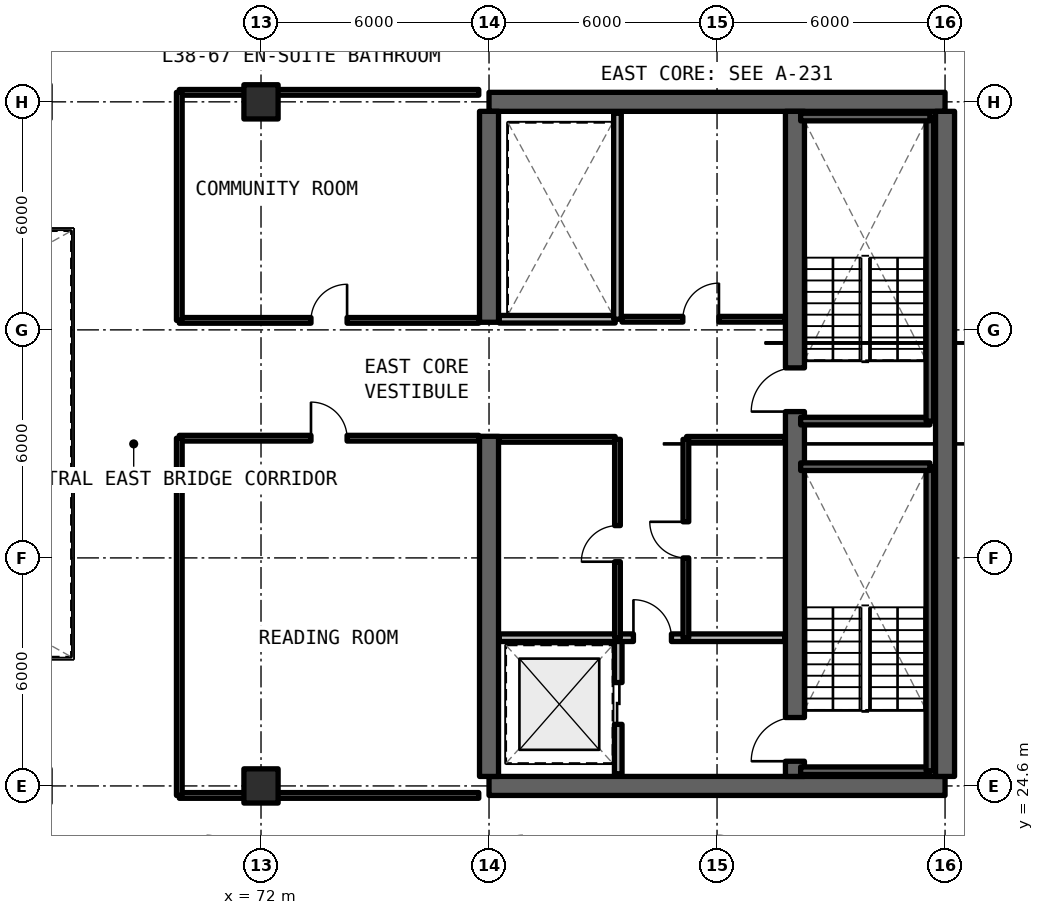
"""IFC4 building model, lengths in metres.
Left out: names, types, materials, properties, quantities, classifications, styles, units other than length and angle.
Written with IfcOpenShell. Run it as: python <this file> out.ifc"""

import sys

from ifc_helpers import new_model, si_unit, direction, frame, frame_2d, origin, origin_2d, place, context, subcontext, project, spatial, rectangle, extrude, element, fill, save


model = new_model("IFC4")
c1 = context("Model", 3, precision=1e-05, world=origin(), true_north=direction((0.0, 1.0)))
c2 = subcontext(c1, "Body", "Model", "MODEL_VIEW")
j1 = project(units=[si_unit("LENGTHUNIT", "METRE"), si_unit("PLANEANGLEUNIT", "RADIAN")], contexts=[c1])
p1 = place(None, origin())
s1 = spatial("IfcSite", under=j1, at=p1, CompositionType="ELEMENT")
p2 = place(p1, origin())
s2 = spatial("IfcBuilding", under=s1, at=p2, CompositionType="ELEMENT")
p3 = place(p2, frame((0.0, 0.0, 138.6)))
s3 = spatial("IfcBuildingStorey", under=s2, at=p3, CompositionType="ELEMENT", Elevation=138.6)
for number, where, z_axis, x_axis in (
    (1, (78.0, 24.6, 0.0), (0.0, 0.0, 1.0), (1.0, 0.0, 0.0)),
    (2, (90.0, 42.6, 0.0), (0.0, 0.0, 1.0), (-1.0, 0.0, 0.0)),
):
    element("IfcWall", number, at=place(p3, frame(where, z_axis=z_axis, x_axis=x_axis)), inside=s3, PredefinedType="SHEAR", context=c2, shape_type="SweptSolid", body=[
        extrude(rectangle(XDim=12.0, YDim=0.5, at=frame_2d((6.0, 0.0))), origin(), (0.0, 0.0, 1.0), 3.3),
    ])
p4 = place(p3, frame((90.0, 24.85, 0.0), z_axis=(0.0, 0.0, 1.0), x_axis=(0.0, 1.0, 0.0)))
e3 = element("IfcWall", 3, at=p4, inside=s3, PredefinedType="SHEAR", context=c2, shape_type="SweptSolid", body=[
    extrude(rectangle(XDim=17.5, YDim=0.5, at=frame_2d((8.75, 0.0))), origin(), (0.0, 0.0, 1.0), 3.3),
])
p5 = place(p3, frame((78.0, 24.85, 0.0), z_axis=(0.0, 0.0, 1.0), x_axis=(0.0, 1.0, 0.0)))
e4 = element("IfcWall", 4, at=p5, inside=s3, PredefinedType="SHEAR", context=c2, shape_type="SweptSolid", body=[
    extrude(rectangle(XDim=8.95, YDim=0.5, at=frame_2d((4.475, 0.0))), origin(), (0.0, 0.0, 1.0), 3.3),
])
p6 = place(p3, frame((78.0, 36.8, 0.0), z_axis=(0.0, 0.0, 1.0), x_axis=(0.0, 1.0, 0.0)))
e5 = element("IfcWall", 5, at=p6, inside=s3, PredefinedType="SHEAR", context=c2, shape_type="SweptSolid", body=[
    extrude(rectangle(XDim=5.55, YDim=0.5, at=frame_2d((2.775, 0.0))), origin(), (0.0, 0.0, 1.0), 3.3),
])
p7 = place(p3, frame((86.05, 24.85, 0.0), z_axis=(0.0, 0.0, 1.0), x_axis=(0.0, 1.0, 0.0)))
e6 = element("IfcWall", 6, at=p7, inside=s3, PredefinedType="SHEAR", context=c2, shape_type="SweptSolid", body=[
    extrude(rectangle(XDim=17.5, YDim=0.5, at=frame_2d((8.75, 0.0))), origin(), (0.0, 0.0, 1.0), 3.3),
])
p8 = place(p7, frame((0.4, 0.0, 0.0)))
e7 = element("IfcOpeningElement", 7, at=p8, cuts=e6, PredefinedType="OPENING", context=c2, shape_type="SweptSolid", body=[
    extrude(rectangle(XDim=1.15, YDim=2.15, at=frame_2d((0.575, 1.075))), frame((0.0, 0.26, 0.0), z_axis=(0.0, -1.0, 0.0), x_axis=(1.0, 0.0, 0.0)), (0.0, 0.0, 1.0), 0.52),
])
p9 = place(p7, frame((9.6, 0.0, 0.0)))
e8 = element("IfcOpeningElement", 8, at=p9, cuts=e6, PredefinedType="OPENING", context=c2, shape_type="SweptSolid", body=[
    extrude(rectangle(XDim=1.15, YDim=2.15, at=frame_2d((0.575, 1.075))), frame((0.0, 0.26, 0.0), z_axis=(0.0, -1.0, 0.0), x_axis=(1.0, 0.0, 0.0)), (0.0, 0.0, 1.0), 0.52),
])
for number, where, z_axis, x_axis in (
    (9, (72.0, 24.6, 0.0), (0.0, 0.0, 1.0), (1.0, 0.0, 0.0)),
    (10, (72.0, 42.6, 0.0), (0.0, 0.0, 1.0), (1.0, 0.0, 0.0)),
):
    element("IfcColumn", number, at=place(p3, frame(where, z_axis=z_axis, x_axis=x_axis)), inside=s3, PredefinedType="COLUMN", context=c2, shape_type="SweptSolid", body=[
        extrude(rectangle(XDim=0.9, YDim=0.9, at=origin_2d()), origin(), (0.0, 0.0, 1.0), 3.3),
    ])
p10 = place(p3, frame((81.4, 24.92, 0.0), z_axis=(0.0, 0.0, 1.0), x_axis=(0.0, 1.0, 0.0)))
e11 = element("IfcWall", 11, at=p10, inside=s3, PredefinedType="SOLIDWALL", context=c2, shape_type="SweptSolid", body=[
    extrude(rectangle(XDim=3.58, YDim=0.2, at=frame_2d((1.79, 0.0))), origin(), (0.0, 0.0, 1.0), 2.35),
])
p11 = place(p10, frame((1.3, 0.0, 0.0)))
e12 = element("IfcOpeningElement", 12, at=p11, cuts=e11, PredefinedType="OPENING", context=c2, shape_type="SweptSolid", body=[
    extrude(rectangle(XDim=1.1, YDim=2.2, at=frame_2d((0.55, 1.1))), frame((0.0, 0.11, 0.0), z_axis=(0.0, -1.0, 0.0), x_axis=(1.0, 0.0, 0.0)), (0.0, 0.0, 1.0), 0.22),
])
p12 = place(p3, frame((78.27, 28.5, 0.0), z_axis=(0.0, 0.0, 1.0), x_axis=(1.0, 0.0, 0.0)))
e13 = element("IfcWall", 13, at=p12, inside=s3, PredefinedType="SOLIDWALL", context=c2, shape_type="SweptSolid", body=[
    extrude(rectangle(XDim=7.51, YDim=0.2, at=frame_2d((3.755, 0.0))), origin(), (0.0, 0.0, 1.0), 2.35),
])
p13 = place(p12, frame((3.53, 0.0, 0.0)))
e14 = element("IfcOpeningElement", 14, at=p13, cuts=e13, PredefinedType="OPENING", context=c2, shape_type="SweptSolid", body=[
    extrude(rectangle(XDim=1.0, YDim=2.15, at=frame_2d((0.5, 1.075))), frame((0.0, 0.11, 0.0), z_axis=(0.0, -1.0, 0.0), x_axis=(1.0, 0.0, 0.0)), (0.0, 0.0, 1.0), 0.22),
])
p14 = place(p3, frame((83.2, 33.72, 0.0), z_axis=(0.0, 0.0, 1.0), x_axis=(1.0, 0.0, 0.0)))
e15 = element("IfcWall", 15, at=p14, inside=s3, PredefinedType="SOLIDWALL", context=c2, shape_type="SweptSolid", body=[
    extrude(rectangle(XDim=2.58, YDim=0.15, at=frame_2d((1.29, 0.0))), origin(), (0.0, 0.0, 1.0), 2.35),
])
p15 = place(p3, frame((83.18, 28.5, 0.0), z_axis=(0.0, 0.0, 1.0), x_axis=(0.0, 1.0, 0.0)))
e16 = element("IfcWall", 16, at=p15, inside=s3, PredefinedType="SOLIDWALL", context=c2, shape_type="SweptSolid", body=[
    extrude(rectangle(XDim=5.22, YDim=0.15, at=frame_2d((2.61, 0.0))), origin(), (0.0, 0.0, 1.0), 2.35),
])
p16 = place(p15, frame((2.1, 0.0, 0.0)))
e17 = element("IfcOpeningElement", 17, at=p16, cuts=e16, PredefinedType="OPENING", context=c2, shape_type="SweptSolid", body=[
    extrude(rectangle(XDim=0.95, YDim=2.15, at=frame_2d((0.475, 1.075))), frame((0.0, 0.085, 0.0), z_axis=(0.0, -1.0, 0.0), x_axis=(1.0, 0.0, 0.0)), (0.0, 0.0, 1.0), 0.17),
])
p17 = place(p3, frame((78.27, 33.72, 0.0), z_axis=(0.0, 0.0, 1.0), x_axis=(1.0, 0.0, 0.0)))
e18 = element("IfcWall", 18, at=p17, inside=s3, PredefinedType="SOLIDWALL", context=c2, shape_type="SweptSolid", body=[
    extrude(rectangle(XDim=3.05, YDim=0.15, at=frame_2d((1.525, 0.0))), origin(), (0.0, 0.0, 1.0), 2.35),
])
p18 = place(p3, frame((81.38, 28.5, 0.0), z_axis=(0.0, 0.0, 1.0), x_axis=(0.0, 1.0, 0.0)))
e19 = element("IfcWall", 19, at=p18, inside=s3, PredefinedType="SOLIDWALL", context=c2, shape_type="SweptSolid", body=[
    extrude(rectangle(XDim=5.22, YDim=0.15, at=frame_2d((2.61, 0.0))), origin(), (0.0, 0.0, 1.0), 2.35),
])
p19 = place(p18, frame((2.0, 0.0, 0.0)))
e20 = element("IfcOpeningElement", 20, at=p19, cuts=e19, PredefinedType="OPENING", context=c2, shape_type="SweptSolid", body=[
    extrude(rectangle(XDim=0.95, YDim=2.15, at=frame_2d((0.475, 1.075))), frame((0.0, 0.085, 0.0), z_axis=(0.0, -1.0, 0.0), x_axis=(1.0, 0.0, 0.0)), (0.0, 0.0, 1.0), 0.17),
])
p20 = place(p3, frame((81.5, 36.88, 0.0), z_axis=(0.0, 0.0, 1.0), x_axis=(1.0, 0.0, 0.0)))
e21 = element("IfcWall", 21, at=p20, inside=s3, PredefinedType="SOLIDWALL", context=c2, shape_type="SweptSolid", body=[
    extrude(rectangle(XDim=4.28, YDim=0.15, at=frame_2d((2.14, 0.0))), origin(), (0.0, 0.0, 1.0), 2.35),
])
p21 = place(p20, frame((1.6, 0.0, 0.0)))
e22 = element("IfcOpeningElement", 22, at=p21, cuts=e21, PredefinedType="OPENING", context=c2, shape_type="SweptSolid", body=[
    extrude(rectangle(XDim=0.95, YDim=2.15, at=frame_2d((0.475, 1.075))), frame((0.0, 0.085, 0.0), z_axis=(0.0, -1.0, 0.0), x_axis=(1.0, 0.0, 0.0)), (0.0, 0.0, 1.0), 0.17),
])
p22 = place(p3, frame((78.27, 36.88, 0.0), z_axis=(0.0, 0.0, 1.0), x_axis=(1.0, 0.0, 0.0)))
e23 = element("IfcWall", 23, at=p22, inside=s3, PredefinedType="SOLIDWALL", context=c2, shape_type="SweptSolid", body=[
    extrude(rectangle(XDim=3.05, YDim=0.2, at=frame_2d((1.525, 0.0))), origin(), (0.0, 0.0, 1.0), 2.35),
])
p23 = place(p3, frame((81.38, 36.88, 0.0), z_axis=(0.0, 0.0, 1.0), x_axis=(0.0, 1.0, 0.0)))
e24 = element("IfcWall", 24, at=p23, inside=s3, PredefinedType="SOLIDWALL", context=c2, shape_type="SweptSolid", body=[
    extrude(rectangle(XDim=5.42, YDim=0.2, at=frame_2d((2.71, 0.0))), origin(), (0.0, 0.0, 1.0), 2.35),
])
p24 = place(p3, frame((69.85, 24.35, 0.0), z_axis=(0.0, 0.0, 1.0), x_axis=(1.0, 0.0, 0.0)))
e25 = element("IfcWall", 25, at=p24, inside=s3, PredefinedType="SOLIDWALL", context=c2, shape_type="SweptSolid", body=[
    extrude(rectangle(XDim=7.88, YDim=0.15, at=frame_2d((3.94, 0.0))), origin(), (0.0, 0.0, 1.0), 2.35),
])
p25 = place(p3, frame((69.85, 33.75, 0.0), z_axis=(0.0, 0.0, 1.0), x_axis=(1.0, 0.0, 0.0)))
e26 = element("IfcWall", 26, at=p25, inside=s3, PredefinedType="SOLIDWALL", context=c2, shape_type="SweptSolid", body=[
    extrude(rectangle(XDim=7.88, YDim=0.15, at=frame_2d((3.94, 0.0))), origin(), (0.0, 0.0, 1.0), 2.35),
])
p26 = place(p25, frame((3.465, 0.0, 0.0)))
e27 = element("IfcOpeningElement", 27, at=p26, cuts=e26, PredefinedType="OPENING", context=c2, shape_type="SweptSolid", body=[
    extrude(rectangle(XDim=0.95, YDim=2.15, at=frame_2d((0.475, 1.075))), frame((0.0, 0.085, 0.0), z_axis=(0.0, -1.0, 0.0), x_axis=(1.0, 0.0, 0.0)), (0.0, 0.0, 1.0), 0.17),
])
p27 = place(p3, frame((69.85, 24.35, 0.0), z_axis=(0.0, 0.0, 1.0), x_axis=(0.0, 1.0, 0.0)))
e28 = element("IfcWall", 28, at=p27, inside=s3, PredefinedType="SOLIDWALL", context=c2, shape_type="SweptSolid", body=[
    extrude(rectangle(XDim=9.4, YDim=0.15, at=frame_2d((4.7, 0.0))), origin(), (0.0, 0.0, 1.0), 2.35),
])
p28 = place(p3, frame((69.85, 36.85, 0.0), z_axis=(0.0, 0.0, 1.0), x_axis=(1.0, 0.0, 0.0)))
e29 = element("IfcWall", 29, at=p28, inside=s3, PredefinedType="SOLIDWALL", context=c2, shape_type="SweptSolid", body=[
    extrude(rectangle(XDim=7.88, YDim=0.15, at=frame_2d((3.94, 0.0))), origin(), (0.0, 0.0, 1.0), 2.35),
])
p29 = place(p28, frame((3.465, 0.0, 0.0)))
e30 = element("IfcOpeningElement", 30, at=p29, cuts=e29, PredefinedType="OPENING", context=c2, shape_type="SweptSolid", body=[
    extrude(rectangle(XDim=0.95, YDim=2.15, at=frame_2d((0.475, 1.075))), frame((0.0, 0.085, 0.0), z_axis=(0.0, -1.0, 0.0), x_axis=(1.0, 0.0, 0.0)), (0.0, 0.0, 1.0), 0.17),
])
p30 = place(p3, frame((69.85, 42.85, 0.0), z_axis=(0.0, 0.0, 1.0), x_axis=(1.0, 0.0, 0.0)))
e31 = element("IfcWall", 31, at=p30, inside=s3, PredefinedType="SOLIDWALL", context=c2, shape_type="SweptSolid", body=[
    extrude(rectangle(XDim=7.88, YDim=0.15, at=frame_2d((3.94, 0.0))), origin(), (0.0, 0.0, 1.0), 2.35),
])
p31 = place(p3, frame((69.85, 36.85, 0.0), z_axis=(0.0, 0.0, 1.0), x_axis=(0.0, 1.0, 0.0)))
e32 = element("IfcWall", 32, at=p31, inside=s3, PredefinedType="SOLIDWALL", context=c2, shape_type="SweptSolid", body=[
    extrude(rectangle(XDim=6.0, YDim=0.15, at=frame_2d((3.0, 0.0))), origin(), (0.0, 0.0, 1.0), 2.35),
])
p32 = place(p3, frame((86.2, 25.0, 0.0), z_axis=(0.0, 0.0, 1.0), x_axis=(1.0, 0.0, 0.0)))
e33 = element("IfcWall", 33, at=p32, inside=s3, PredefinedType="SOLIDWALL", context=c2, shape_type="SweptSolid", body=[
    extrude(rectangle(XDim=3.4, YDim=0.2, at=frame_2d((1.7, 0.0))), origin(), (0.0, 0.0, 1.0), 3.3),
])
p33 = place(p3, frame((89.6, 25.0, 0.0), z_axis=(0.0, 0.0, 1.0), x_axis=(0.0, 1.0, 0.0)))
e34 = element("IfcWall", 34, at=p33, inside=s3, PredefinedType="SOLIDWALL", context=c2, shape_type="SweptSolid", body=[
    extrude(rectangle(XDim=8.0, YDim=0.2, at=frame_2d((4.0, 0.0))), origin(), (0.0, 0.0, 1.0), 3.3),
])
for number, where, z_axis, x_axis in (
    (35, (89.6, 33.0, 0.0), (0.0, 0.0, 1.0), (-1.0, 0.0, 0.0)),
    (36, (86.2, 34.2, 0.0), (0.0, 0.0, 1.0), (1.0, 0.0, 0.0)),
):
    element("IfcWall", number, at=place(p3, frame(where, z_axis=z_axis, x_axis=x_axis)), inside=s3, PredefinedType="SOLIDWALL", context=c2, shape_type="SweptSolid", body=[
        extrude(rectangle(XDim=3.4, YDim=0.2, at=frame_2d((1.7, 0.0))), origin(), (0.0, 0.0, 1.0), 3.3),
    ])
p34 = place(p3, frame((89.6, 34.2, 0.0), z_axis=(0.0, 0.0, 1.0), x_axis=(0.0, 1.0, 0.0)))
e37 = element("IfcWall", 37, at=p34, inside=s3, PredefinedType="SOLIDWALL", context=c2, shape_type="SweptSolid", body=[
    extrude(rectangle(XDim=8.0, YDim=0.2, at=frame_2d((4.0, 0.0))), origin(), (0.0, 0.0, 1.0), 3.3),
])
p35 = place(p3, frame((89.6, 42.2, 0.0), z_axis=(0.0, 0.0, 1.0), x_axis=(-1.0, 0.0, 0.0)))
e38 = element("IfcWall", 38, at=p35, inside=s3, PredefinedType="SOLIDWALL", context=c2, shape_type="SweptSolid", body=[
    extrude(rectangle(XDim=3.4, YDim=0.2, at=frame_2d((1.7, 0.0))), origin(), (0.0, 0.0, 1.0), 3.3),
])
p36 = place(p11, origin())
e39 = element("IfcDoor", 39, at=p36, inside=s3, OperationType="SLIDING_TO_LEFT", PredefinedType="DOOR", context=c2, shape_type="SweptSolid", body=[
    extrude(rectangle(XDim=1.1, YDim=2.2, at=frame_2d((0.55, 1.1))), frame((0.0, 0.025, 0.0), z_axis=(0.0, -1.0, 0.0), x_axis=(1.0, 0.0, 0.0)), (0.0, 0.0, 1.0), 0.05),
])
fill(e12, e39)
p37 = place(p13, origin())
e40 = element("IfcDoor", 40, at=p37, inside=s3, OperationType="SINGLE_SWING_LEFT", PredefinedType="DOOR", context=c2, shape_type="SweptSolid", body=[
    extrude(rectangle(XDim=1.0, YDim=2.15, at=frame_2d((0.5, 1.075))), frame((0.0, 0.025, 0.0), z_axis=(0.0, -1.0, 0.0), x_axis=(1.0, 0.0, 0.0)), (0.0, 0.0, 1.0), 0.05),
])
fill(e14, e40)
p38 = place(p16, origin())
e41 = element("IfcDoor", 41, at=p38, inside=s3, OperationType="SINGLE_SWING_RIGHT", PredefinedType="DOOR", context=c2, shape_type="SweptSolid", body=[
    extrude(rectangle(XDim=0.95, YDim=2.15, at=frame_2d((0.475, 1.075))), frame((0.0, 0.025, 0.0), z_axis=(0.0, -1.0, 0.0), x_axis=(1.0, 0.0, 0.0)), (0.0, 0.0, 1.0), 0.05),
])
fill(e17, e41)
p39 = place(p19, origin())
e42 = element("IfcDoor", 42, at=p39, inside=s3, OperationType="SINGLE_SWING_LEFT", PredefinedType="DOOR", context=c2, shape_type="SweptSolid", body=[
    extrude(rectangle(XDim=0.95, YDim=2.15, at=frame_2d((0.475, 1.075))), frame((0.0, 0.025, 0.0), z_axis=(0.0, -1.0, 0.0), x_axis=(1.0, 0.0, 0.0)), (0.0, 0.0, 1.0), 0.05),
])
fill(e20, e42)
p40 = place(p21, origin())
e43 = element("IfcDoor", 43, at=p40, inside=s3, OperationType="SINGLE_SWING_RIGHT", PredefinedType="DOOR", context=c2, shape_type="SweptSolid", body=[
    extrude(rectangle(XDim=0.95, YDim=2.15, at=frame_2d((0.475, 1.075))), frame((0.0, 0.025, 0.0), z_axis=(0.0, -1.0, 0.0), x_axis=(1.0, 0.0, 0.0)), (0.0, 0.0, 1.0), 0.05),
])
fill(e22, e43)
p41 = place(p26, origin())
e44 = element("IfcDoor", 44, at=p41, inside=s3, OperationType="SINGLE_SWING_LEFT", PredefinedType="DOOR", context=c2, shape_type="SweptSolid", body=[
    extrude(rectangle(XDim=0.95, YDim=2.15, at=frame_2d((0.475, 1.075))), frame((0.0, 0.025, 0.0), z_axis=(0.0, -1.0, 0.0), x_axis=(1.0, 0.0, 0.0)), (0.0, 0.0, 1.0), 0.05),
])
fill(e27, e44)
p42 = place(p29, origin())
e45 = element("IfcDoor", 45, at=p42, inside=s3, OperationType="SINGLE_SWING_RIGHT", PredefinedType="DOOR", context=c2, shape_type="SweptSolid", body=[
    extrude(rectangle(XDim=0.95, YDim=2.15, at=frame_2d((0.475, 1.075))), frame((0.0, 0.025, 0.0), z_axis=(0.0, -1.0, 0.0), x_axis=(1.0, 0.0, 0.0)), (0.0, 0.0, 1.0), 0.05),
])
fill(e30, e45)
p43 = place(p8, origin())
e46 = element("IfcDoor", 46, at=p43, inside=s3, OperationType="SINGLE_SWING_RIGHT", PredefinedType="DOOR", context=c2, shape_type="SweptSolid", body=[
    extrude(rectangle(XDim=1.15, YDim=2.15, at=frame_2d((0.575, 1.075))), frame((0.0, 0.025, 0.0), z_axis=(0.0, -1.0, 0.0), x_axis=(1.0, 0.0, 0.0)), (0.0, 0.0, 1.0), 0.05),
])
fill(e7, e46)
p44 = place(p9, origin())
e47 = element("IfcDoor", 47, at=p44, inside=s3, OperationType="SINGLE_SWING_LEFT", PredefinedType="DOOR", context=c2, shape_type="SweptSolid", body=[
    extrude(rectangle(XDim=1.15, YDim=2.15, at=frame_2d((0.575, 1.075))), frame((0.0, 0.025, 0.0), z_axis=(0.0, -1.0, 0.0), x_axis=(1.0, 0.0, 0.0)), (0.0, 0.0, 1.0), 0.05),
])
fill(e8, e47)
save(model, sys.argv[1])
